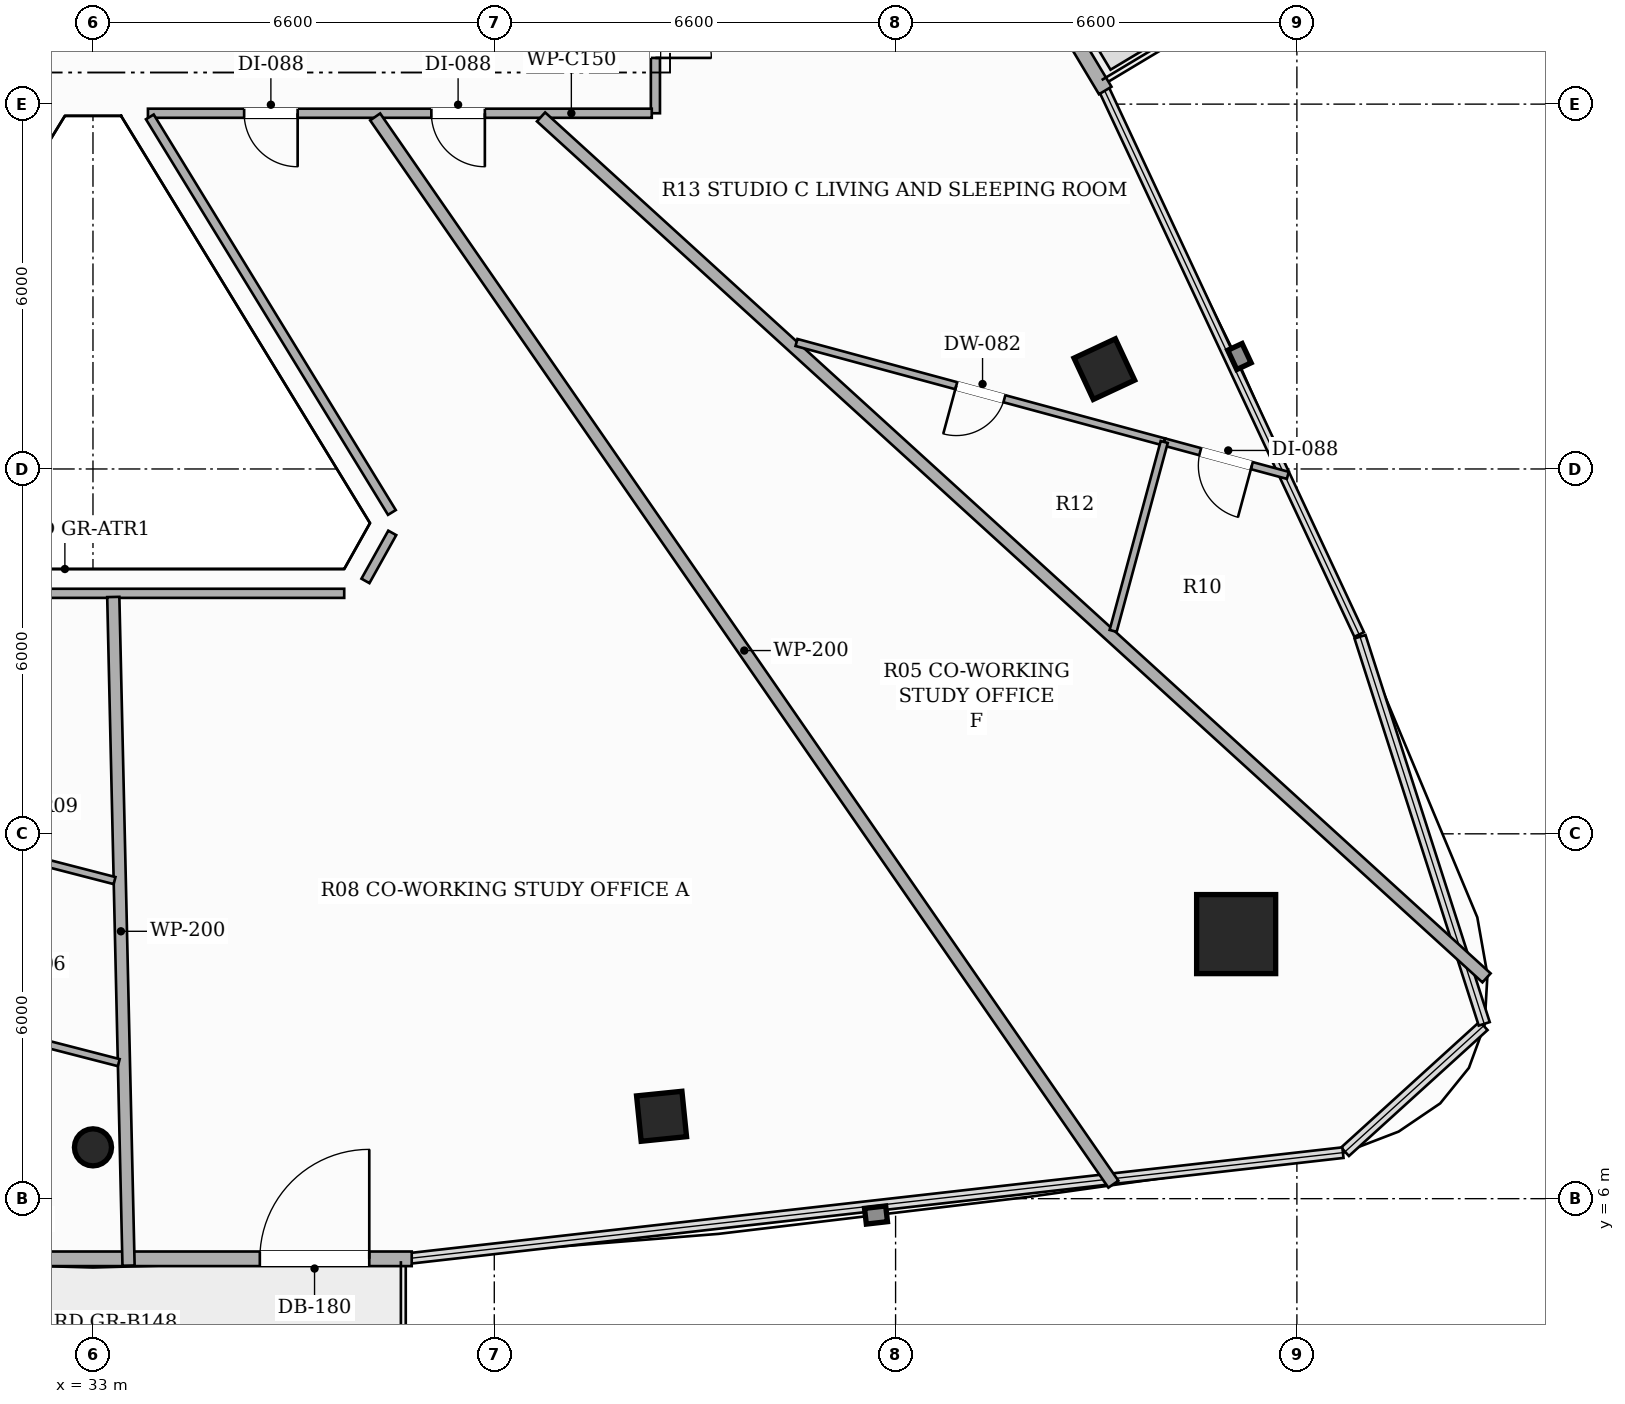
"""IFC4 building model, lengths in metres.
Left out: names, types, materials, properties, quantities, classifications, styles, units other than length and angle.
Written with IfcOpenShell. Run it as: python <this file> out.ifc"""

import sys

from ifc_helpers import new_model, si_unit, direction, frame, frame_2d, origin, origin_2d, place, context, subcontext, project, spatial, rectangle, hollow_rectangle, hollow_circle, extrude, element, fill, save


model = new_model("IFC4")
c1 = context("Model", 3, precision=1e-05, world=origin(), true_north=direction((0.0, 1.0)))
c2 = subcontext(c1, "Body", "Model", "MODEL_VIEW")
j1 = project(units=[si_unit("LENGTHUNIT", "METRE"), si_unit("PLANEANGLEUNIT", "RADIAN")], contexts=[c1])
p1 = place(None, origin())
s1 = spatial("IfcSite", under=j1, at=p1, CompositionType="ELEMENT")
p2 = place(p1, origin())
s2 = spatial("IfcBuilding", under=s1, at=p2, CompositionType="ELEMENT")
p3 = place(p2, frame((0.0, 0.0, 229.4)))
s3 = spatial("IfcBuildingStorey", under=s2, at=p3, CompositionType="ELEMENT", Elevation=229.4)
p4 = place(p3, frame((51.801, 10.351, 0.0), z_axis=(0.0, 0.0, 1.0), x_axis=(1.0, 0.0, 0.0)))
e1 = element("IfcColumn", 1, at=p4, inside=s3, PredefinedType="COLUMN", context=c2, shape_type="SweptSolid", body=[
    extrude(hollow_rectangle(XDim=1.3, YDim=1.3, WallThickness=0.04, at=origin_2d()), origin(), (0.0, 0.0, 1.0), 3.3),
])
p5 = place(p3, frame((33.0, 6.844, 0.0), z_axis=(0.0, 0.0, 1.0), x_axis=(1.0, 0.0, 0.0)))
e2 = element("IfcColumn", 2, at=p5, inside=s3, PredefinedType="COLUMN", context=c2, shape_type="SweptSolid", body=[
    extrude(hollow_circle(Radius=0.305, WallThickness=0.016, at=origin_2d()), origin(), (0.0, 0.0, 1.0), 3.3),
])
for number, where, z_axis, x_axis in (
    (3, (42.351, 7.355, 0.0), (0.0, 0.0, 1.0), (0.995, 0.101, 0.0)),
    (4, (49.633, 19.642, 0.0), (0.0, 0.0, 1.0), (-0.423, 0.906, 0.0)),
):
    element("IfcColumn", number, at=place(p3, frame(where, z_axis=z_axis, x_axis=x_axis)), inside=s3, PredefinedType="COLUMN", context=c2, shape_type="SweptSolid", body=[
        extrude(hollow_rectangle(XDim=0.75, YDim=0.75, WallThickness=0.025, at=origin_2d()), origin(), (0.0, 0.0, 1.0), 3.3),
    ])
p6 = place(p3, frame((27.758, 5.011, 0.0), z_axis=(0.0, 0.0, 1.0), x_axis=(1.0, 0.0, 0.0)))
e5 = element("IfcWall", 5, at=p6, inside=s3, PredefinedType="SOLIDWALL", context=c2, shape_type="SweptSolid", body=[
    extrude(rectangle(XDim=10.484, YDim=0.24, at=frame_2d((5.242, 0.0))), origin(), (0.0, 0.0, 1.0), 2.624),
])
p7 = place(p6, frame((7.986, 0.0, 0.0)))
e6 = element("IfcOpeningElement", 6, at=p7, cuts=e5, PredefinedType="OPENING", context=c2, shape_type="SweptSolid", body=[
    extrude(rectangle(XDim=1.8, YDim=2.2, at=frame_2d((0.9, 1.1))), frame((0.0, 0.13, 0.0), z_axis=(0.0, -1.0, 0.0), x_axis=(1.0, 0.0, 0.0)), (0.0, 0.0, 1.0), 0.26),
])
p8 = place(p3, frame((49.648, 24.224, 0.0), z_axis=(0.0, 0.0, 1.0), x_axis=(-0.514346935205, 0.857582200285, 0.0)))
e7 = element("IfcWall", 7, at=p8, inside=s3, PredefinedType="SOLIDWALL", context=c2, shape_type="SweptSolid", body=[
    extrude(rectangle(XDim=10.133, YDim=0.24, at=frame_2d((5.066, 0.0))), origin(), (0.0, 0.0, 1.0), 2.624),
])
p9 = place(p8, frame((7.635, 0.0, 0.0)))
e8 = element("IfcOpeningElement", 8, at=p9, cuts=e7, PredefinedType="OPENING", context=c2, shape_type="SweptSolid", body=[
    extrude(rectangle(XDim=1.8, YDim=2.2, at=frame_2d((0.9, 1.1))), frame((0.0, 0.13, 0.0), z_axis=(0.0, -1.0, 0.0), x_axis=(1.0, 0.0, 0.0)), (0.0, 0.0, 1.0), 0.26),
])
p10 = place(p3, frame((42.25, 26.59, 0.0), z_axis=(0.0, 0.0, 1.0), x_axis=(0.0, -1.0, 0.0)))
e9 = element("IfcWall", 9, at=p10, inside=s3, PredefinedType="PARTITIONING", context=c2, shape_type="SweptSolid", body=[
    extrude(rectangle(XDim=2.74, YDim=0.15, at=frame_2d((1.37, 0.0))), origin(), (0.0, 0.0, 1.0), 2.773),
])
p11 = place(p10, frame((0.91, 0.0, 0.0)))
e10 = element("IfcOpeningElement", 10, at=p11, cuts=e9, PredefinedType="OPENING", context=c2, shape_type="SweptSolid", body=[
    extrude(rectangle(XDim=0.92, YDim=2.15, at=frame_2d((0.46, 1.075))), frame((0.0, 0.085, 0.0), z_axis=(0.0, -1.0, 0.0), x_axis=(1.0, 0.0, 0.0)), (0.0, 0.0, 1.0), 0.17),
])
p12 = place(p3, frame((42.19, 23.85, 0.0), z_axis=(0.0, 0.0, 1.0), x_axis=(-1.0, 0.0, 0.0)))
e11 = element("IfcWall", 11, at=p12, inside=s3, PredefinedType="PARTITIONING", context=c2, shape_type="SweptSolid", body=[
    extrude(rectangle(XDim=8.286, YDim=0.15, at=frame_2d((4.143, 0.0))), origin(), (0.0, 0.0, 1.0), 2.565),
])
p13 = place(p12, frame((5.824, 0.0, 0.0)))
e12 = element("IfcOpeningElement", 12, at=p13, cuts=e11, PredefinedType="OPENING", context=c2, shape_type="SweptSolid", body=[
    extrude(rectangle(XDim=0.88, YDim=2.1, at=frame_2d((0.44, 1.05))), frame((0.0, 0.085, 0.0), z_axis=(0.0, -1.0, 0.0), x_axis=(1.0, 0.0, 0.0)), (0.0, 0.0, 1.0), 0.17),
])
p14 = place(p12, frame((2.745, 0.0, 0.0)))
e13 = element("IfcOpeningElement", 13, at=p14, cuts=e11, PredefinedType="OPENING", context=c2, shape_type="SweptSolid", body=[
    extrude(rectangle(XDim=0.88, YDim=2.1, at=frame_2d((0.44, 1.05))), frame((0.0, 0.085, 0.0), z_axis=(0.0, -1.0, 0.0), x_axis=(1.0, 0.0, 0.0)), (0.0, 0.0, 1.0), 0.17),
])
p15 = place(p3, frame((33.935, 23.79, 0.0), z_axis=(0.0, 0.0, 1.0), x_axis=(0.521984684225, -0.852954857794, 0.0)))
e14 = element("IfcWall", 14, at=p15, inside=s3, PredefinedType="PARTITIONING", context=c2, shape_type="SweptSolid", body=[
    extrude(rectangle(XDim=7.626, YDim=0.15, at=frame_2d((3.813, 0.0))), origin(), (0.0, 0.0, 1.0), 2.773),
])
p16 = place(p3, frame((37.922, 16.949, 0.0), z_axis=(0.0, 0.0, 1.0), x_axis=(-0.48754316559, -0.873098884255, 0.0)))
e15 = element("IfcWall", 15, at=p16, inside=s3, PredefinedType="PARTITIONING", context=c2, shape_type="SweptSolid", body=[
    extrude(rectangle(XDim=0.905, YDim=0.15, at=frame_2d((0.452, 0.0))), origin(), (0.0, 0.0, 1.0), 3.06),
])
p17 = place(p3, frame((37.132, 15.955, 0.0), z_axis=(0.0, 0.0, 1.0), x_axis=(-1.0, 0.0, 0.0)))
e16 = element("IfcWall", 16, at=p17, inside=s3, PredefinedType="PARTITIONING", context=c2, shape_type="SweptSolid", body=[
    extrude(rectangle(XDim=8.264, YDim=0.15, at=frame_2d((4.132, 0.0))), origin(), (0.0, 0.0, 1.0), 2.773),
])
p18 = place(p3, frame((33.585, 4.899, 0.0), z_axis=(0.0, 0.0, 1.0), x_axis=(-0.022818213595, 0.999739630668, 0.0)))
e17 = element("IfcWall", 17, at=p18, inside=s3, PredefinedType="PARTITIONING", context=c2, shape_type="SweptSolid", body=[
    extrude(rectangle(XDim=10.999, YDim=0.2, at=frame_2d((5.5, 0.0))), origin(), (0.0, 0.0, 1.0), 2.492),
])
p19 = place(p3, frame((37.641, 23.79, 0.0), z_axis=(0.0, 0.0, 1.0), x_axis=(0.568876812748, -0.822422745258, 0.0)))
e18 = element("IfcWall", 18, at=p19, inside=s3, PredefinedType="PARTITIONING", context=c2, shape_type="SweptSolid", body=[
    extrude(rectangle(XDim=21.342, YDim=0.2, at=frame_2d((10.671, 0.0))), origin(), (0.0, 0.0, 1.0), 2.492),
])
p20 = place(p3, frame((55.919, 9.631, 0.0), z_axis=(0.0, 0.0, 1.0), x_axis=(-0.739406671307, 0.673259069324, 0.0)))
e19 = element("IfcWall", 19, at=p20, inside=s3, PredefinedType="PARTITIONING", context=c2, shape_type="SweptSolid", body=[
    extrude(rectangle(XDim=21.031, YDim=0.2, at=frame_2d((10.515, 0.0))), origin(), (0.0, 0.0, 1.0), 2.492),
])
p21 = place(p3, frame((50.618, 18.444, 0.0), z_axis=(0.0, 0.0, 1.0), x_axis=(-0.96530580675, 0.261122001091, 0.0)))
e20 = element("IfcWall", 20, at=p21, inside=s3, PredefinedType="PARTITIONING", context=c2, shape_type="SweptSolid", body=[
    extrude(rectangle(XDim=6.265, YDim=0.12, at=frame_2d((3.133, 0.0))), origin(), (0.0, 0.0, 1.0), 2.492),
])
p22 = place(p21, frame((2.723, 0.0, 0.0)))
e21 = element("IfcOpeningElement", 21, at=p22, cuts=e20, PredefinedType="OPENING", context=c2, shape_type="SweptSolid", body=[
    extrude(rectangle(XDim=0.82, YDim=2.1, at=frame_2d((0.41, 1.05))), frame((0.0, 0.07, 0.0), z_axis=(0.0, -1.0, 0.0), x_axis=(1.0, 0.0, 0.0)), (0.0, 0.0, 1.0), 0.14),
])
p23 = place(p3, frame((52.651, 17.895, 0.0), z_axis=(0.0, 0.0, 1.0), x_axis=(-0.96540836449, 0.260742573765, 0.0)))
e22 = element("IfcWall", 22, at=p23, inside=s3, PredefinedType="PARTITIONING", context=c2, shape_type="SweptSolid", body=[
    extrude(rectangle(XDim=2.106, YDim=0.12, at=frame_2d((1.053, 0.0))), origin(), (0.0, 0.0, 1.0), 2.619),
])
p24 = place(p23, frame((0.613, 0.0, 0.0)))
e23 = element("IfcOpeningElement", 23, at=p24, cuts=e22, PredefinedType="OPENING", context=c2, shape_type="SweptSolid", body=[
    extrude(rectangle(XDim=0.88, YDim=2.1, at=frame_2d((0.44, 1.05))), frame((0.0, 0.07, 0.0), z_axis=(0.0, -1.0, 0.0), x_axis=(1.0, 0.0, 0.0)), (0.0, 0.0, 1.0), 0.14),
])
p25 = place(p3, frame((50.618, 18.444, 0.0), z_axis=(0.0, 0.0, 1.0), x_axis=(-0.260928129887, -0.965358229381, 0.0)))
e24 = element("IfcWall", 24, at=p25, inside=s3, PredefinedType="PARTITIONING", context=c2, shape_type="SweptSolid", body=[
    extrude(rectangle(XDim=3.219, YDim=0.12, at=frame_2d((1.609, 0.0))), origin(), (0.0, 0.0, 1.0), 2.492),
])
p26 = place(p3, frame((33.355, 11.231, 0.0), z_axis=(0.0, 0.0, 1.0), x_axis=(-0.968291630449, 0.249822573846, 0.0)))
e25 = element("IfcWall", 25, at=p26, inside=s3, PredefinedType="PARTITIONING", context=c2, shape_type="SweptSolid", body=[
    extrude(rectangle(XDim=2.93, YDim=0.12, at=frame_2d((1.465, 0.0))), origin(), (0.0, 0.0, 1.0), 2.773),
])
p27 = place(p3, frame((33.424, 8.237, 0.0), z_axis=(0.0, 0.0, 1.0), x_axis=(-0.968383623763, 0.249465743595, 0.0)))
e26 = element("IfcWall", 26, at=p27, inside=s3, PredefinedType="PARTITIONING", context=c2, shape_type="SweptSolid", body=[
    extrude(rectangle(XDim=3.743, YDim=0.12, at=frame_2d((1.872, 0.0))), origin(), (0.0, 0.0, 1.0), 2.773),
])
p28 = place(p7, origin())
e27 = element("IfcDoor", 27, at=p28, inside=s3, OperationType="SINGLE_SWING_RIGHT", PredefinedType="DOOR", context=c2, shape_type="SweptSolid", body=[
    extrude(rectangle(XDim=1.8, YDim=2.2, at=frame_2d((0.9, 1.1))), frame((0.0, 0.025, 0.0), z_axis=(0.0, -1.0, 0.0), x_axis=(1.0, 0.0, 0.0)), (0.0, 0.0, 1.0), 0.05),
])
fill(e6, e27)
p29 = place(p13, origin())
e28 = element("IfcDoor", 28, at=p29, inside=s3, OperationType="SINGLE_SWING_LEFT", PredefinedType="DOOR", context=c2, shape_type="SweptSolid", body=[
    extrude(rectangle(XDim=0.88, YDim=2.1, at=frame_2d((0.44, 1.05))), frame((0.0, 0.025, 0.0), z_axis=(0.0, -1.0, 0.0), x_axis=(1.0, 0.0, 0.0)), (0.0, 0.0, 1.0), 0.05),
])
fill(e12, e28)
p30 = place(p11, origin())
e29 = element("IfcDoor", 29, at=p30, inside=s3, OperationType="SINGLE_SWING_RIGHT", PredefinedType="DOOR", context=c2, shape_type="SweptSolid", body=[
    extrude(rectangle(XDim=0.92, YDim=2.15, at=frame_2d((0.46, 1.075))), frame((0.0, 0.025, 0.0), z_axis=(0.0, -1.0, 0.0), x_axis=(1.0, 0.0, 0.0)), (0.0, 0.0, 1.0), 0.05),
])
fill(e10, e29)
p31 = place(p22, origin())
e30 = element("IfcDoor", 30, at=p31, inside=s3, OperationType="SINGLE_SWING_RIGHT", PredefinedType="DOOR", context=c2, shape_type="SweptSolid", body=[
    extrude(rectangle(XDim=0.82, YDim=2.1, at=frame_2d((0.41, 1.05))), frame((0.0, 0.025, 0.0), z_axis=(0.0, -1.0, 0.0), x_axis=(1.0, 0.0, 0.0)), (0.0, 0.0, 1.0), 0.05),
])
fill(e21, e30)
p32 = place(p24, origin())
e31 = element("IfcDoor", 31, at=p32, inside=s3, OperationType="SINGLE_SWING_LEFT", PredefinedType="DOOR", context=c2, shape_type="SweptSolid", body=[
    extrude(rectangle(XDim=0.88, YDim=2.1, at=frame_2d((0.44, 1.05))), frame((0.0, 0.025, 0.0), z_axis=(0.0, -1.0, 0.0), x_axis=(1.0, 0.0, 0.0)), (0.0, 0.0, 1.0), 0.05),
])
fill(e23, e31)
p33 = place(p14, origin())
e32 = element("IfcDoor", 32, at=p33, inside=s3, OperationType="SINGLE_SWING_LEFT", PredefinedType="DOOR", context=c2, shape_type="SweptSolid", body=[
    extrude(rectangle(XDim=0.88, YDim=2.1, at=frame_2d((0.44, 1.05))), frame((0.0, 0.025, 0.0), z_axis=(0.0, -1.0, 0.0), x_axis=(1.0, 0.0, 0.0)), (0.0, 0.0, 1.0), 0.05),
])
fill(e13, e32)
save(model, sys.argv[1])
